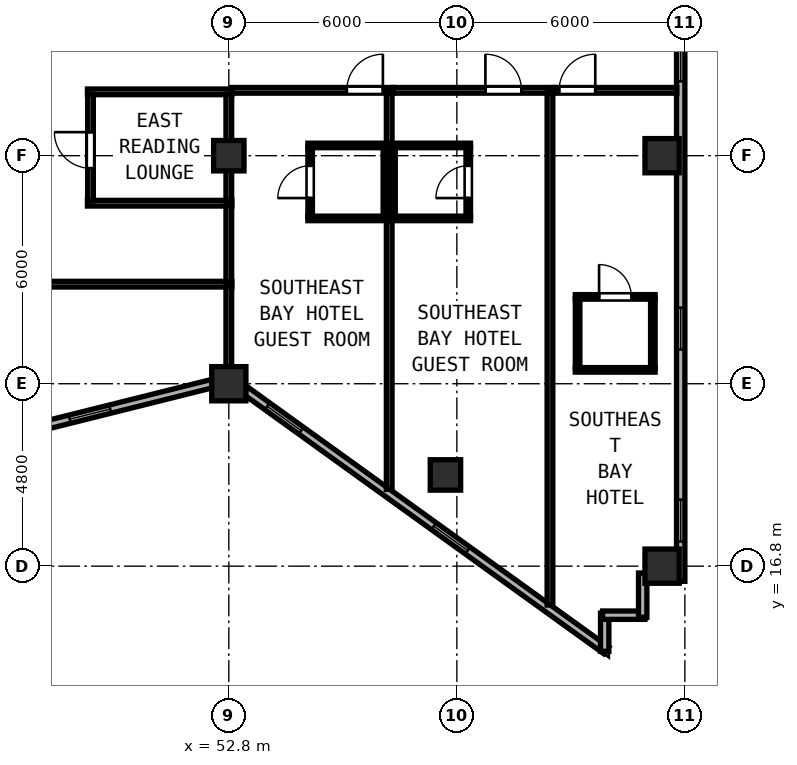
"""IFC4 building model, lengths in metres.
Left out: names, types, materials, properties, quantities, classifications, styles, units other than length and angle.
Written with IfcOpenShell. Run it as: python <this file> out.ifc"""

import sys

from ifc_helpers import new_model, si_unit, direction, frame, frame_2d, origin, origin_2d, place, context, subcontext, project, spatial, rectangle, hollow_rectangle, extrude, element, fill, save


model = new_model("IFC4")
c1 = context("Model", 3, precision=1e-05, world=origin(), true_north=direction((0.0, 1.0)))
c2 = subcontext(c1, "Body", "Model", "MODEL_VIEW")
j1 = project(units=[si_unit("LENGTHUNIT", "METRE"), si_unit("PLANEANGLEUNIT", "RADIAN")], contexts=[c1])
p1 = place(None, origin())
s1 = spatial("IfcSite", under=j1, at=p1, CompositionType="ELEMENT")
p2 = place(p1, origin())
s2 = spatial("IfcBuilding", under=s1, at=p2, CompositionType="ELEMENT")
p3 = place(p2, frame((0.0, 0.0, 199.4)))
s3 = spatial("IfcBuildingStorey", under=s2, at=p3, CompositionType="ELEMENT", Elevation=199.4)
for number, where, z_axis, x_axis in (
    (1, (52.8, 21.6, 0.0), (0.0, 0.0, 1.0), (1.0, 0.0, 0.0)),
    (2, (64.2, 16.8, 0.0), (0.0, 0.0, 1.0), (1.0, 0.0, 0.0)),
    (3, (64.2, 27.6, 0.0), (0.0, 0.0, 1.0), (1.0, 0.0, 0.0)),
):
    element("IfcColumn", number, at=place(p3, frame(where, z_axis=z_axis, x_axis=x_axis)), inside=s3, PredefinedType="COLUMN", context=c2, shape_type="SweptSolid", body=[
        extrude(hollow_rectangle(XDim=0.9, YDim=0.9, WallThickness=0.034, at=origin_2d()), origin(), (0.0, 0.0, 1.0), 3.8),
    ])
for number, where, z_axis, x_axis in (
    (4, (52.8, 27.6, 0.0), (0.0, 0.0, 1.0), (1.0, 0.0, 0.0)),
    (5, (58.5, 19.2, 0.0), (0.0, 0.0, 1.0), (1.0, 0.0, 0.0)),
):
    element("IfcColumn", number, at=place(p3, frame(where, z_axis=z_axis, x_axis=x_axis)), inside=s3, PredefinedType="COLUMN", context=c2, shape_type="SweptSolid", body=[
        extrude(hollow_rectangle(XDim=0.8, YDim=0.8, WallThickness=0.03, at=origin_2d()), origin(), (0.0, 0.0, 1.0), 3.8),
    ])
p4 = place(p3, frame((47.933, 20.497, 0.0), z_axis=(0.0, 0.0, 1.0), x_axis=(0.970142500145, 0.242535625036, 0.0)))
e6 = element("IfcWall", 6, at=p4, inside=s3, PredefinedType="SOLIDWALL", context=c2, shape_type="SweptSolid", body=[
    extrude(rectangle(XDim=4.561, YDim=0.22, at=frame_2d((2.281, 0.0))), origin(), (0.0, 0.0, 1.0), 3.215),
])
p5 = place(p4, frame((0.7, 0.0, 0.85)))
e7 = element("IfcOpeningElement", 7, at=p5, cuts=e6, PredefinedType="OPENING", context=c2, shape_type="SweptSolid", body=[
    extrude(rectangle(XDim=1.1, YDim=1.75, at=frame_2d((0.55, 0.875))), frame((0.0, 0.12, 0.0), z_axis=(0.0, -1.0, 0.0), x_axis=(1.0, 0.0, 0.0)), (0.0, 0.0, 1.0), 0.24),
])
p6 = place(p3, frame((53.242, 21.417, 0.0), z_axis=(0.0, 0.0, 1.0), x_axis=(0.811534737332, -0.58430417601, 0.0)))
e8 = element("IfcWall", 8, at=p6, inside=s3, PredefinedType="SOLIDWALL", context=c2, shape_type="SweptSolid", body=[
    extrude(rectangle(XDim=11.697, YDim=0.22, at=frame_2d((5.849, 0.0))), origin(), (0.0, 0.0, 1.0), 3.215),
])
p7 = place(p6, frame((0.7, 0.0, 0.85)))
e9 = element("IfcOpeningElement", 9, at=p7, cuts=e8, PredefinedType="OPENING", context=c2, shape_type="SweptSolid", body=[
    extrude(rectangle(XDim=1.1, YDim=1.75, at=frame_2d((0.55, 0.875))), frame((0.0, 0.12, 0.0), z_axis=(0.0, -1.0, 0.0), x_axis=(1.0, 0.0, 0.0)), (0.0, 0.0, 1.0), 0.24),
])
p8 = place(p6, frame((6.1, 0.0, 0.85)))
e10 = element("IfcOpeningElement", 10, at=p8, cuts=e8, PredefinedType="OPENING", context=c2, shape_type="SweptSolid", body=[
    extrude(rectangle(XDim=1.1, YDim=1.75, at=frame_2d((0.55, 0.875))), frame((0.0, 0.12, 0.0), z_axis=(0.0, -1.0, 0.0), x_axis=(1.0, 0.0, 0.0)), (0.0, 0.0, 1.0), 0.24),
])
p9 = place(p3, frame((62.69, 14.56, 0.0), z_axis=(0.0, 0.0, 1.0), x_axis=(0.0, 1.0, 0.0)))
e11 = element("IfcWall", 11, at=p9, inside=s3, PredefinedType="SOLIDWALL", context=c2, shape_type="SweptSolid", body=[
    extrude(rectangle(XDim=1.005, YDim=0.22, at=frame_2d((0.502, 0.0))), origin(), (0.0, 0.0, 1.0), 3.62),
])
p10 = place(p3, frame((62.635, 15.51, 0.0), z_axis=(0.0, 0.0, 1.0), x_axis=(1.0, 0.0, 0.0)))
e12 = element("IfcWall", 12, at=p10, inside=s3, PredefinedType="SOLIDWALL", context=c2, shape_type="SweptSolid", body=[
    extrude(rectangle(XDim=1.11, YDim=0.22, at=frame_2d((0.555, 0.0))), origin(), (0.0, 0.0, 1.0), 3.62),
])
p11 = place(p3, frame((63.69, 15.455, 0.0), z_axis=(0.0, 0.0, 1.0), x_axis=(0.0, 1.0, 0.0)))
e13 = element("IfcWall", 13, at=p11, inside=s3, PredefinedType="SOLIDWALL", context=c2, shape_type="SweptSolid", body=[
    extrude(rectangle(XDim=1.165, YDim=0.22, at=frame_2d((0.583, 0.0))), origin(), (0.0, 0.0, 1.0), 3.62),
])
p12 = place(p3, frame((64.69, 16.4, 0.0), z_axis=(0.0, 0.0, 1.0), x_axis=(0.0, 1.0, 0.0)))
e14 = element("IfcWall", 14, at=p12, inside=s3, PredefinedType="SOLIDWALL", context=c2, shape_type="SweptSolid", body=[
    extrude(rectangle(XDim=21.145, YDim=0.22, at=frame_2d((10.573, 0.0))), origin(), (0.0, 0.0, 1.0), 3.62),
])
p13 = place(p12, frame((1.05, 0.0, 0.85)))
e15 = element("IfcOpeningElement", 15, at=p13, cuts=e14, PredefinedType="OPENING", context=c2, shape_type="SweptSolid", body=[
    extrude(rectangle(XDim=1.1, YDim=1.75, at=frame_2d((0.55, 0.875))), frame((0.0, 0.12, 0.0), z_axis=(0.0, -1.0, 0.0), x_axis=(1.0, 0.0, 0.0)), (0.0, 0.0, 1.0), 0.24),
])
p14 = place(p12, frame((6.1, 0.0, 0.85)))
e16 = element("IfcOpeningElement", 16, at=p14, cuts=e14, PredefinedType="OPENING", context=c2, shape_type="SweptSolid", body=[
    extrude(rectangle(XDim=1.1, YDim=1.75, at=frame_2d((0.55, 0.875))), frame((0.0, 0.12, 0.0), z_axis=(0.0, -1.0, 0.0), x_axis=(1.0, 0.0, 0.0)), (0.0, 0.0, 1.0), 0.24),
])
p15 = place(p12, frame((13.155, 0.0, 0.85)))
e17 = element("IfcOpeningElement", 17, at=p15, cuts=e14, PredefinedType="OPENING", context=c2, shape_type="SweptSolid", body=[
    extrude(rectangle(XDim=1.1, YDim=1.75, at=frame_2d((0.55, 0.875))), frame((0.0, 0.12, 0.0), z_axis=(0.0, -1.0, 0.0), x_axis=(1.0, 0.0, 0.0)), (0.0, 0.0, 1.0), 0.24),
])
p16 = place(p12, frame((16.9, 0.0, 0.85)))
e18 = element("IfcOpeningElement", 18, at=p16, cuts=e14, PredefinedType="OPENING", context=c2, shape_type="SweptSolid", body=[
    extrude(rectangle(XDim=1.1, YDim=1.75, at=frame_2d((0.55, 0.875))), frame((0.0, 0.12, 0.0), z_axis=(0.0, -1.0, 0.0), x_axis=(1.0, 0.0, 0.0)), (0.0, 0.0, 1.0), 0.24),
])
for number, where, z_axis, x_axis in (
    (19, (49.08, 29.28, 0.0), (0.0, 0.0, 1.0), (1.0, 0.0, 0.0)),
    (20, (49.08, 26.35, 0.0), (0.0, 0.0, 1.0), (1.0, 0.0, 0.0)),
):
    element("IfcWall", number, at=place(p3, frame(where, z_axis=z_axis, x_axis=x_axis)), inside=s3, PredefinedType="PARTITIONING", context=c2, shape_type="SweptSolid", body=[
        extrude(rectangle(XDim=3.8, YDim=0.15, at=frame_2d((1.9, 0.0))), origin(), (0.0, 0.0, 1.0), 3.62),
    ])
p17 = place(p3, frame((49.16, 26.41, 0.0), z_axis=(0.0, 0.0, 1.0), x_axis=(0.0, 1.0, 0.0)))
e21 = element("IfcWall", 21, at=p17, inside=s3, PredefinedType="PARTITIONING", context=c2, shape_type="SweptSolid", body=[
    extrude(rectangle(XDim=2.81, YDim=0.15, at=frame_2d((1.405, 0.0))), origin(), (0.0, 0.0, 1.0), 3.62),
])
p18 = place(p17, frame((0.86, 0.0, 0.0)))
e22 = element("IfcOpeningElement", 22, at=p18, cuts=e21, PredefinedType="OPENING", context=c2, shape_type="SweptSolid", body=[
    extrude(rectangle(XDim=0.95, YDim=2.12, at=frame_2d((0.475, 1.06))), frame((0.0, 0.085, 0.0), z_axis=(0.0, -1.0, 0.0), x_axis=(1.0, 0.0, 0.0)), (0.0, 0.0, 1.0), 0.17),
])
p19 = place(p3, frame((52.8, 26.41, 0.0), z_axis=(0.0, 0.0, 1.0), x_axis=(0.0, 1.0, 0.0)))
e23 = element("IfcWall", 23, at=p19, inside=s3, PredefinedType="PARTITIONING", context=c2, shape_type="SweptSolid", body=[
    extrude(rectangle(XDim=2.81, YDim=0.15, at=frame_2d((1.405, 0.0))), origin(), (0.0, 0.0, 1.0), 3.215),
])
p20 = place(p3, frame((45.682, 24.22, 0.0), z_axis=(0.0, 0.0, 1.0), x_axis=(1.0, 0.0, 0.0)))
e24 = element("IfcWall", 24, at=p20, inside=s3, PredefinedType="PARTITIONING", context=c2, shape_type="SweptSolid", body=[
    extrude(rectangle(XDim=7.198, YDim=0.15, at=frame_2d((3.599, 0.0))), origin(), (0.0, 0.0, 1.0), 3.62),
])
p21 = place(p20, frame((2.143, 0.0, 0.0), z_axis=(0.0, 0.0, 1.0), x_axis=(-1.0, 0.0, 0.0)))
e25 = element("IfcOpeningElement", 25, at=p21, cuts=e24, PredefinedType="OPENING", context=c2, shape_type="SweptSolid", body=[
    extrude(rectangle(XDim=0.95, YDim=2.12, at=frame_2d((0.475, 1.06))), frame((0.0, 0.085, 0.0), z_axis=(0.0, -1.0, 0.0), x_axis=(1.0, 0.0, 0.0)), (0.0, 0.0, 1.0), 0.17),
])
p22 = place(p3, frame((52.8, 21.819, 0.0), z_axis=(0.0, 0.0, 1.0), x_axis=(0.0, 1.0, 0.0)))
e26 = element("IfcWall", 26, at=p22, inside=s3, PredefinedType="PARTITIONING", context=c2, shape_type="SweptSolid", body=[
    extrude(rectangle(XDim=2.341, YDim=0.15, at=frame_2d((1.171, 0.0))), origin(), (0.0, 0.0, 1.0), 3.215),
])
p23 = place(p3, frame((52.882, 29.32, 0.0), z_axis=(0.0, 0.0, 1.0), x_axis=(1.0, 0.0, 0.0)))
e27 = element("IfcWall", 27, at=p23, inside=s3, PredefinedType="PARTITIONING", context=c2, shape_type="SweptSolid", body=[
    extrude(rectangle(XDim=4.238, YDim=0.15, at=frame_2d((2.119, 0.0))), origin(), (0.0, 0.0, 1.0), 3.62),
])
p24 = place(p23, frame((3.972, 0.0, 0.0), z_axis=(0.0, 0.0, 1.0), x_axis=(-1.0, 0.0, 0.0)))
e28 = element("IfcOpeningElement", 28, at=p24, cuts=e27, PredefinedType="OPENING", context=c2, shape_type="SweptSolid", body=[
    extrude(rectangle(XDim=0.95, YDim=2.15, at=frame_2d((0.475, 1.075))), frame((0.0, 0.085, 0.0), z_axis=(0.0, -1.0, 0.0), x_axis=(1.0, 0.0, 0.0)), (0.0, 0.0, 1.0), 0.17),
])
p25 = place(p3, frame((52.8, 24.28, 0.0), z_axis=(0.0, 0.0, 1.0), x_axis=(0.0, 1.0, 0.0)))
e29 = element("IfcWall", 29, at=p25, inside=s3, PredefinedType="PARTITIONING", context=c2, shape_type="SweptSolid", body=[
    extrude(rectangle(XDim=2.01, YDim=0.15, at=frame_2d((1.005, 0.0))), origin(), (0.0, 0.0, 1.0), 3.215),
])
p26 = place(p3, frame((57.02, 18.823, 0.0), z_axis=(0.0, 0.0, 1.0), x_axis=(0.0, 1.0, 0.0)))
e30 = element("IfcWall", 30, at=p26, inside=s3, PredefinedType="PARTITIONING", context=c2, shape_type="SweptSolid", body=[
    extrude(rectangle(XDim=10.437, YDim=0.15, at=frame_2d((5.219, 0.0))), origin(), (0.0, 0.0, 1.0), 3.62),
])
for number, where, z_axis, x_axis in (
    (31, (54.88, 27.87, 0.0), (0.0, 0.0, 1.0), (1.0, 0.0, 0.0)),
    (32, (54.88, 25.95, 0.0), (0.0, 0.0, 1.0), (1.0, 0.0, 0.0)),
):
    element("IfcWall", number, at=place(p3, frame(where, z_axis=z_axis, x_axis=x_axis)), inside=s3, PredefinedType="PARTITIONING", context=c2, shape_type="SweptSolid", body=[
        extrude(rectangle(XDim=2.08, YDim=0.12, at=frame_2d((1.04, 0.0))), origin(), (0.0, 0.0, 1.0), 3.62),
    ])
p27 = place(p3, frame((54.94, 25.995, 0.0), z_axis=(0.0, 0.0, 1.0), x_axis=(0.0, 1.0, 0.0)))
e33 = element("IfcWall", 33, at=p27, inside=s3, PredefinedType="PARTITIONING", context=c2, shape_type="SweptSolid", body=[
    extrude(rectangle(XDim=1.83, YDim=0.12, at=frame_2d((0.915, 0.0))), origin(), (0.0, 0.0, 1.0), 3.62),
])
p28 = place(p27, frame((1.34, 0.0, 0.0), z_axis=(0.0, 0.0, 1.0), x_axis=(-1.0, 0.0, 0.0)))
e34 = element("IfcOpeningElement", 34, at=p28, cuts=e33, PredefinedType="OPENING", context=c2, shape_type="SweptSolid", body=[
    extrude(rectangle(XDim=0.85, YDim=2.1, at=frame_2d((0.425, 1.05))), frame((0.0, 0.07, 0.0), z_axis=(0.0, -1.0, 0.0), x_axis=(1.0, 0.0, 0.0)), (0.0, 0.0, 1.0), 0.14),
])
p29 = place(p3, frame((56.92, 25.995, 0.0), z_axis=(0.0, 0.0, 1.0), x_axis=(0.0, 1.0, 0.0)))
e35 = element("IfcWall", 35, at=p29, inside=s3, PredefinedType="PARTITIONING", context=c2, shape_type="SweptSolid", body=[
    extrude(rectangle(XDim=1.83, YDim=0.12, at=frame_2d((0.915, 0.0))), origin(), (0.0, 0.0, 1.0), 3.62),
])
p30 = place(p3, frame((57.122, 29.32, 0.0), z_axis=(0.0, 0.0, 1.0), x_axis=(1.0, 0.0, 0.0)))
e36 = element("IfcWall", 36, at=p30, inside=s3, PredefinedType="PARTITIONING", context=c2, shape_type="SweptSolid", body=[
    extrude(rectangle(XDim=4.228, YDim=0.15, at=frame_2d((2.114, 0.0))), origin(), (0.0, 0.0, 1.0), 3.62),
])
p31 = place(p30, frame((3.379, 0.0, 0.0), z_axis=(0.0, 0.0, 1.0), x_axis=(-1.0, 0.0, 0.0)))
e37 = element("IfcOpeningElement", 37, at=p31, cuts=e36, PredefinedType="OPENING", context=c2, shape_type="SweptSolid", body=[
    extrude(rectangle(XDim=0.95, YDim=2.15, at=frame_2d((0.475, 1.075))), frame((0.0, 0.085, 0.0), z_axis=(0.0, -1.0, 0.0), x_axis=(1.0, 0.0, 0.0)), (0.0, 0.0, 1.0), 0.17),
])
p32 = place(p3, frame((61.25, 15.777, 0.0), z_axis=(0.0, 0.0, 1.0), x_axis=(0.0, 1.0, 0.0)))
e38 = element("IfcWall", 38, at=p32, inside=s3, PredefinedType="PARTITIONING", context=c2, shape_type="SweptSolid", body=[
    extrude(rectangle(XDim=13.483, YDim=0.15, at=frame_2d((6.741, 0.0))), origin(), (0.0, 0.0, 1.0), 3.62),
])
for number, where, z_axis, x_axis in (
    (39, (57.08, 27.87, 0.0), (0.0, 0.0, 1.0), (1.0, 0.0, 0.0)),
    (40, (57.08, 25.95, 0.0), (0.0, 0.0, 1.0), (1.0, 0.0, 0.0)),
):
    element("IfcWall", number, at=place(p3, frame(where, z_axis=z_axis, x_axis=x_axis)), inside=s3, PredefinedType="PARTITIONING", context=c2, shape_type="SweptSolid", body=[
        extrude(rectangle(XDim=2.08, YDim=0.12, at=frame_2d((1.04, 0.0))), origin(), (0.0, 0.0, 1.0), 3.62),
    ])
p33 = place(p3, frame((57.12, 25.995, 0.0), z_axis=(0.0, 0.0, 1.0), x_axis=(0.0, 1.0, 0.0)))
e41 = element("IfcWall", 41, at=p33, inside=s3, PredefinedType="PARTITIONING", context=c2, shape_type="SweptSolid", body=[
    extrude(rectangle(XDim=1.83, YDim=0.12, at=frame_2d((0.915, 0.0))), origin(), (0.0, 0.0, 1.0), 3.62),
])
p34 = place(p3, frame((59.1, 25.995, 0.0), z_axis=(0.0, 0.0, 1.0), x_axis=(0.0, 1.0, 0.0)))
e42 = element("IfcWall", 42, at=p34, inside=s3, PredefinedType="PARTITIONING", context=c2, shape_type="SweptSolid", body=[
    extrude(rectangle(XDim=1.83, YDim=0.12, at=frame_2d((0.915, 0.0))), origin(), (0.0, 0.0, 1.0), 3.62),
])
p35 = place(p34, frame((0.49, 0.0, 0.0)))
e43 = element("IfcOpeningElement", 43, at=p35, cuts=e42, PredefinedType="OPENING", context=c2, shape_type="SweptSolid", body=[
    extrude(rectangle(XDim=0.85, YDim=2.1, at=frame_2d((0.425, 1.05))), frame((0.0, 0.07, 0.0), z_axis=(0.0, -1.0, 0.0), x_axis=(1.0, 0.0, 0.0)), (0.0, 0.0, 1.0), 0.14),
])
p36 = place(p3, frame((61.352, 29.32, 0.0), z_axis=(0.0, 0.0, 1.0), x_axis=(1.0, 0.0, 0.0)))
e44 = element("IfcWall", 44, at=p36, inside=s3, PredefinedType="PARTITIONING", context=c2, shape_type="SweptSolid", body=[
    extrude(rectangle(XDim=3.236, YDim=0.15, at=frame_2d((1.618, 0.0))), origin(), (0.0, 0.0, 1.0), 3.62),
])
p37 = place(p36, frame((1.09, 0.0, 0.0), z_axis=(0.0, 0.0, 1.0), x_axis=(-1.0, 0.0, 0.0)))
e45 = element("IfcOpeningElement", 45, at=p37, cuts=e44, PredefinedType="OPENING", context=c2, shape_type="SweptSolid", body=[
    extrude(rectangle(XDim=0.95, YDim=2.15, at=frame_2d((0.475, 1.075))), frame((0.0, 0.085, 0.0), z_axis=(0.0, -1.0, 0.0), x_axis=(1.0, 0.0, 0.0)), (0.0, 0.0, 1.0), 0.17),
])
p38 = place(p3, frame((61.917, 23.885, 0.0), z_axis=(0.0, 0.0, 1.0), x_axis=(1.0, 0.0, 0.0)))
e46 = element("IfcWall", 46, at=p38, inside=s3, PredefinedType="PARTITIONING", context=c2, shape_type="SweptSolid", body=[
    extrude(rectangle(XDim=2.1, YDim=0.12, at=frame_2d((1.05, 0.0))), origin(), (0.0, 0.0, 1.0), 3.62),
])
p39 = place(p38, frame((1.475, 0.0, 0.0), z_axis=(0.0, 0.0, 1.0), x_axis=(-1.0, 0.0, 0.0)))
e47 = element("IfcOpeningElement", 47, at=p39, cuts=e46, PredefinedType="OPENING", context=c2, shape_type="SweptSolid", body=[
    extrude(rectangle(XDim=0.85, YDim=2.1, at=frame_2d((0.425, 1.05))), frame((0.0, 0.07, 0.0), z_axis=(0.0, -1.0, 0.0), x_axis=(1.0, 0.0, 0.0)), (0.0, 0.0, 1.0), 0.14),
])
p40 = place(p3, frame((61.917, 21.965, 0.0), z_axis=(0.0, 0.0, 1.0), x_axis=(1.0, 0.0, 0.0)))
e48 = element("IfcWall", 48, at=p40, inside=s3, PredefinedType="PARTITIONING", context=c2, shape_type="SweptSolid", body=[
    extrude(rectangle(XDim=2.1, YDim=0.12, at=frame_2d((1.05, 0.0))), origin(), (0.0, 0.0, 1.0), 3.62),
])
for number, where, z_axis, x_axis in (
    (49, (61.977, 22.01, 0.0), (0.0, 0.0, 1.0), (0.0, 1.0, 0.0)),
    (50, (63.957, 22.01, 0.0), (0.0, 0.0, 1.0), (0.0, 1.0, 0.0)),
):
    element("IfcWall", number, at=place(p3, frame(where, z_axis=z_axis, x_axis=x_axis)), inside=s3, PredefinedType="PARTITIONING", context=c2, shape_type="SweptSolid", body=[
        extrude(rectangle(XDim=1.83, YDim=0.12, at=frame_2d((0.915, 0.0))), origin(), (0.0, 0.0, 1.0), 3.62),
    ])
p41 = place(p5, origin())
e51 = element("IfcWindow", 51, at=p41, inside=s3, PartitioningType="SINGLE_PANEL", PredefinedType="WINDOW", context=c2, shape_type="SweptSolid", body=[
    extrude(rectangle(XDim=1.1, YDim=1.75, at=frame_2d((0.55, 0.875))), frame((0.0, 0.03, 0.0), z_axis=(0.0, -1.0, 0.0), x_axis=(1.0, 0.0, 0.0)), (0.0, 0.0, 1.0), 0.06),
])
fill(e7, e51)
p42 = place(p7, origin())
e52 = element("IfcWindow", 52, at=p42, inside=s3, PartitioningType="SINGLE_PANEL", PredefinedType="WINDOW", context=c2, shape_type="SweptSolid", body=[
    extrude(rectangle(XDim=1.1, YDim=1.75, at=frame_2d((0.55, 0.875))), frame((0.0, 0.03, 0.0), z_axis=(0.0, -1.0, 0.0), x_axis=(1.0, 0.0, 0.0)), (0.0, 0.0, 1.0), 0.06),
])
fill(e9, e52)
p43 = place(p8, origin())
e53 = element("IfcWindow", 53, at=p43, inside=s3, PartitioningType="SINGLE_PANEL", PredefinedType="WINDOW", context=c2, shape_type="SweptSolid", body=[
    extrude(rectangle(XDim=1.1, YDim=1.75, at=frame_2d((0.55, 0.875))), frame((0.0, 0.03, 0.0), z_axis=(0.0, -1.0, 0.0), x_axis=(1.0, 0.0, 0.0)), (0.0, 0.0, 1.0), 0.06),
])
fill(e10, e53)
p44 = place(p13, origin())
e54 = element("IfcWindow", 54, at=p44, inside=s3, PartitioningType="SINGLE_PANEL", PredefinedType="WINDOW", context=c2, shape_type="SweptSolid", body=[
    extrude(rectangle(XDim=1.1, YDim=1.75, at=frame_2d((0.55, 0.875))), frame((0.0, 0.03, 0.0), z_axis=(0.0, -1.0, 0.0), x_axis=(1.0, 0.0, 0.0)), (0.0, 0.0, 1.0), 0.06),
])
fill(e15, e54)
p45 = place(p14, origin())
e55 = element("IfcWindow", 55, at=p45, inside=s3, PartitioningType="SINGLE_PANEL", PredefinedType="WINDOW", context=c2, shape_type="SweptSolid", body=[
    extrude(rectangle(XDim=1.1, YDim=1.75, at=frame_2d((0.55, 0.875))), frame((0.0, 0.03, 0.0), z_axis=(0.0, -1.0, 0.0), x_axis=(1.0, 0.0, 0.0)), (0.0, 0.0, 1.0), 0.06),
])
fill(e16, e55)
p46 = place(p15, origin())
e56 = element("IfcWindow", 56, at=p46, inside=s3, PartitioningType="SINGLE_PANEL", PredefinedType="WINDOW", context=c2, shape_type="SweptSolid", body=[
    extrude(rectangle(XDim=1.1, YDim=1.75, at=frame_2d((0.55, 0.875))), frame((0.0, 0.03, 0.0), z_axis=(0.0, -1.0, 0.0), x_axis=(1.0, 0.0, 0.0)), (0.0, 0.0, 1.0), 0.06),
])
fill(e17, e56)
p47 = place(p18, origin())
e57 = element("IfcDoor", 57, at=p47, inside=s3, OperationType="SINGLE_SWING_RIGHT", PredefinedType="DOOR", context=c2, shape_type="SweptSolid", body=[
    extrude(rectangle(XDim=0.95, YDim=2.12, at=frame_2d((0.475, 1.06))), frame((0.0, 0.025, 0.0), z_axis=(0.0, -1.0, 0.0), x_axis=(1.0, 0.0, 0.0)), (0.0, 0.0, 1.0), 0.05),
])
fill(e22, e57)
p48 = place(p24, origin())
e58 = element("IfcDoor", 58, at=p48, inside=s3, OperationType="SINGLE_SWING_LEFT", PredefinedType="DOOR", context=c2, shape_type="SweptSolid", body=[
    extrude(rectangle(XDim=0.95, YDim=2.15, at=frame_2d((0.475, 1.075))), frame((0.0, 0.025, 0.0), z_axis=(0.0, -1.0, 0.0), x_axis=(1.0, 0.0, 0.0)), (0.0, 0.0, 1.0), 0.05),
])
fill(e28, e58)
p49 = place(p28, origin())
e59 = element("IfcDoor", 59, at=p49, inside=s3, OperationType="SINGLE_SWING_RIGHT", PredefinedType="DOOR", context=c2, shape_type="SweptSolid", body=[
    extrude(rectangle(XDim=0.85, YDim=2.1, at=frame_2d((0.425, 1.05))), frame((0.0, 0.025, 0.0), z_axis=(0.0, -1.0, 0.0), x_axis=(1.0, 0.0, 0.0)), (0.0, 0.0, 1.0), 0.05),
])
fill(e34, e59)
p50 = place(p31, origin())
e60 = element("IfcDoor", 60, at=p50, inside=s3, OperationType="SINGLE_SWING_RIGHT", PredefinedType="DOOR", context=c2, shape_type="SweptSolid", body=[
    extrude(rectangle(XDim=0.95, YDim=2.15, at=frame_2d((0.475, 1.075))), frame((0.0, 0.025, 0.0), z_axis=(0.0, -1.0, 0.0), x_axis=(1.0, 0.0, 0.0)), (0.0, 0.0, 1.0), 0.05),
])
fill(e37, e60)
p51 = place(p35, origin())
e61 = element("IfcDoor", 61, at=p51, inside=s3, OperationType="SINGLE_SWING_LEFT", PredefinedType="DOOR", context=c2, shape_type="SweptSolid", body=[
    extrude(rectangle(XDim=0.85, YDim=2.1, at=frame_2d((0.425, 1.05))), frame((0.0, 0.025, 0.0), z_axis=(0.0, -1.0, 0.0), x_axis=(1.0, 0.0, 0.0)), (0.0, 0.0, 1.0), 0.05),
])
fill(e43, e61)
p52 = place(p37, origin())
e62 = element("IfcDoor", 62, at=p52, inside=s3, OperationType="SINGLE_SWING_LEFT", PredefinedType="DOOR", context=c2, shape_type="SweptSolid", body=[
    extrude(rectangle(XDim=0.95, YDim=2.15, at=frame_2d((0.475, 1.075))), frame((0.0, 0.025, 0.0), z_axis=(0.0, -1.0, 0.0), x_axis=(1.0, 0.0, 0.0)), (0.0, 0.0, 1.0), 0.05),
])
fill(e45, e62)
p53 = place(p39, origin())
e63 = element("IfcDoor", 63, at=p53, inside=s3, OperationType="SINGLE_SWING_RIGHT", PredefinedType="DOOR", context=c2, shape_type="SweptSolid", body=[
    extrude(rectangle(XDim=0.85, YDim=2.1, at=frame_2d((0.425, 1.05))), frame((0.0, 0.025, 0.0), z_axis=(0.0, -1.0, 0.0), x_axis=(1.0, 0.0, 0.0)), (0.0, 0.0, 1.0), 0.05),
])
fill(e47, e63)
save(model, sys.argv[1])
